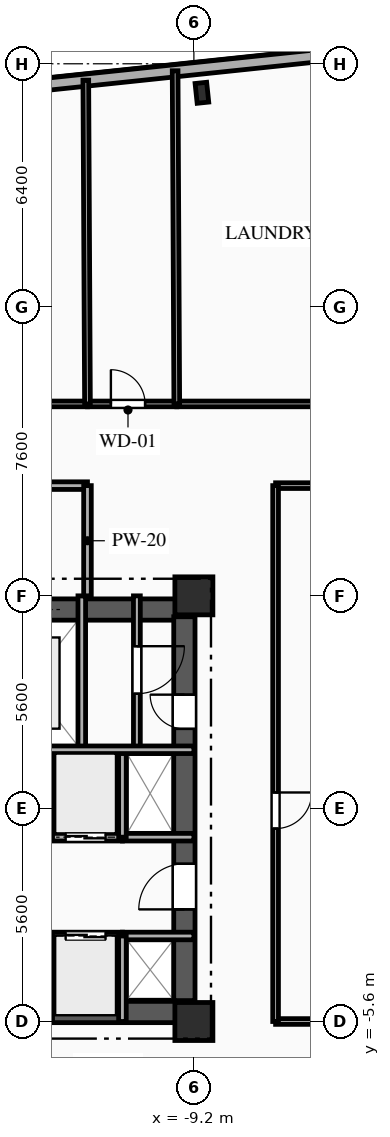
"""IFC4 building model, lengths in metres.
Left out: names, types, materials, properties, quantities, classifications, styles, units other than length and angle.
Written with IfcOpenShell. Run it as: python <this file> out.ifc"""

import sys

from ifc_helpers import new_model, si_unit, direction, frame, frame_2d, origin, origin_2d, place, context, subcontext, project, spatial, rectangle, i_section, extrude, element, fill, save


model = new_model("IFC4")
c1 = context("Model", 3, precision=1e-05, world=origin(), true_north=direction((0.0, 1.0)))
c2 = subcontext(c1, "Body", "Model", "MODEL_VIEW")
j1 = project(units=[si_unit("LENGTHUNIT", "METRE"), si_unit("PLANEANGLEUNIT", "RADIAN")], contexts=[c1])
p1 = place(None, origin())
s1 = spatial("IfcSite", under=j1, at=p1, CompositionType="ELEMENT")
p2 = place(p1, origin())
s2 = spatial("IfcBuilding", under=s1, at=p2, CompositionType="ELEMENT")
p3 = place(p2, frame((0.0, 0.0, 112.5)))
s3 = spatial("IfcBuildingStorey", under=s2, at=p3, CompositionType="ELEMENT", Elevation=112.5)
for number, where, z_axis, x_axis in (
    (1, (-9.2, -5.6, 0.0), (0.0, 0.0, 1.0), (1.0, 0.0, 0.0)),
    (2, (-9.2, 5.6, 0.0), (0.0, 0.0, 1.0), (1.0, 0.0, 0.0)),
):
    element("IfcColumn", number, at=place(p3, frame(where, z_axis=z_axis, x_axis=x_axis)), inside=s3, PredefinedType="COLUMN", context=c2, shape_type="SweptSolid", body=[
        extrude(rectangle(XDim=1.0, YDim=1.0, at=origin_2d()), origin(), (0.0, 0.0, 1.0), 3.35),
    ])
p4 = place(p3, frame((-8.989, 18.836, 0.0), z_axis=(0.0, 0.0, 1.0), x_axis=(0.994521895368, 0.104528463268, 0.0)))
e3 = element("IfcColumn", 3, at=p4, inside=s3, PredefinedType="COLUMN", context=c2, shape_type="SweptSolid", body=[
    extrude(i_section(OverallWidth=0.306, OverallDepth=0.524, WebThickness=0.021, FlangeThickness=0.04, FilletRadius=0.027, at=origin_2d()), origin(), (0.0, 0.0, 1.0), 3.35),
])
p5 = place(p3, frame((-27.107, 17.586, 0.0), z_axis=(0.0, 0.0, 1.0), x_axis=(0.994521628355, 0.104531003701, 0.0)))
e4 = element("IfcWall", 4, at=p5, inside=s3, PredefinedType="SOLIDWALL", context=c2, shape_type="SweptSolid", body=[
    extrude(rectangle(XDim=53.8, YDim=0.32, at=frame_2d((26.9, 0.0))), origin(), (0.0, 0.0, 1.0), 3.045),
])
p6 = place(p5, frame((1.482, 0.0, 0.85)))
e5 = element("IfcOpeningElement", 5, at=p6, cuts=e4, PredefinedType="OPENING", context=c2, shape_type="SweptSolid", body=[
    extrude(rectangle(XDim=1.6, YDim=1.85, at=frame_2d((0.8, 0.925))), frame((0.0, 0.17, 0.0), z_axis=(0.0, -1.0, 0.0), x_axis=(1.0, 0.0, 0.0)), (0.0, 0.0, 1.0), 0.34),
])
p7 = place(p5, frame((6.02, 0.0, 0.85)))
e6 = element("IfcOpeningElement", 6, at=p7, cuts=e4, PredefinedType="OPENING", context=c2, shape_type="SweptSolid", body=[
    extrude(rectangle(XDim=1.65, YDim=1.85, at=frame_2d((0.825, 0.925))), frame((0.0, 0.17, 0.0), z_axis=(0.0, -1.0, 0.0), x_axis=(1.0, 0.0, 0.0)), (0.0, 0.0, 1.0), 0.34),
])
p8 = place(p5, frame((11.584, 0.0, 0.85)))
e7 = element("IfcOpeningElement", 7, at=p8, cuts=e4, PredefinedType="OPENING", context=c2, shape_type="SweptSolid", body=[
    extrude(rectangle(XDim=1.65, YDim=1.85, at=frame_2d((0.825, 0.925))), frame((0.0, 0.17, 0.0), z_axis=(0.0, -1.0, 0.0), x_axis=(1.0, 0.0, 0.0)), (0.0, 0.0, 1.0), 0.34),
])
p9 = place(p5, frame((21.336, 0.0, 0.85)))
e8 = element("IfcOpeningElement", 8, at=p9, cuts=e4, PredefinedType="OPENING", context=c2, shape_type="SweptSolid", body=[
    extrude(rectangle(XDim=1.6, YDim=1.85, at=frame_2d((0.8, 0.925))), frame((0.0, 0.17, 0.0), z_axis=(0.0, -1.0, 0.0), x_axis=(1.0, 0.0, 0.0)), (0.0, 0.0, 1.0), 0.34),
])
p10 = place(p5, frame((31.404, 0.0, 0.85)))
e9 = element("IfcOpeningElement", 9, at=p10, cuts=e4, PredefinedType="OPENING", context=c2, shape_type="SweptSolid", body=[
    extrude(rectangle(XDim=2.2, YDim=1.85, at=frame_2d((1.1, 0.925))), frame((0.0, 0.17, 0.0), z_axis=(0.0, -1.0, 0.0), x_axis=(1.0, 0.0, 0.0)), (0.0, 0.0, 1.0), 0.34),
])
p11 = place(p5, frame((40.486, 0.0, 0.85)))
e10 = element("IfcOpeningElement", 10, at=p11, cuts=e4, PredefinedType="OPENING", context=c2, shape_type="SweptSolid", body=[
    extrude(rectangle(XDim=1.65, YDim=1.85, at=frame_2d((0.825, 0.925))), frame((0.0, 0.17, 0.0), z_axis=(0.0, -1.0, 0.0), x_axis=(1.0, 0.0, 0.0)), (0.0, 0.0, 1.0), 0.34),
])
p12 = place(p5, frame((46.53, 0.0, 0.85)))
e11 = element("IfcOpeningElement", 11, at=p12, cuts=e4, PredefinedType="OPENING", context=c2, shape_type="SweptSolid", body=[
    extrude(rectangle(XDim=1.65, YDim=1.85, at=frame_2d((0.825, 0.925))), frame((0.0, 0.17, 0.0), z_axis=(0.0, -1.0, 0.0), x_axis=(1.0, 0.0, 0.0)), (0.0, 0.0, 1.0), 0.34),
])
p13 = place(p5, frame((51.054, 0.0, 0.85)))
e12 = element("IfcOpeningElement", 12, at=p13, cuts=e4, PredefinedType="OPENING", context=c2, shape_type="SweptSolid", body=[
    extrude(rectangle(XDim=1.65, YDim=1.85, at=frame_2d((0.825, 0.925))), frame((0.0, 0.17, 0.0), z_axis=(0.0, -1.0, 0.0), x_axis=(1.0, 0.0, 0.0)), (0.0, 0.0, 1.0), 0.34),
])
p14 = place(p3, frame((-18.8, 5.24, 0.0), z_axis=(0.0, 0.0, 1.0), x_axis=(1.0, 0.0, 0.0)))
e13 = element("IfcWall", 13, at=p14, inside=s3, PredefinedType="SHEAR", context=c2, shape_type="SweptSolid", body=[
    extrude(rectangle(XDim=9.6, YDim=0.56, at=frame_2d((4.8, 0.0))), origin(), (0.0, 0.0, 1.0), 3.045),
])
p15 = place(p14, frame((1.55, 0.0, 0.0)))
e14 = element("IfcOpeningElement", 14, at=p15, cuts=e13, PredefinedType="OPENING", context=c2, shape_type="SweptSolid", body=[
    extrude(rectangle(XDim=1.1, YDim=2.15, at=frame_2d((0.55, 1.075))), frame((0.0, 0.29, 0.0), z_axis=(0.0, -1.0, 0.0), x_axis=(1.0, 0.0, 0.0)), (0.0, 0.0, 1.0), 0.58),
])
p16 = place(p14, frame((4.775, 0.0, 0.0)))
e15 = element("IfcOpeningElement", 15, at=p16, cuts=e13, PredefinedType="OPENING", context=c2, shape_type="SweptSolid", body=[
    extrude(rectangle(XDim=1.05, YDim=2.1, at=frame_2d((0.525, 1.05))), frame((0.0, 0.29, 0.0), z_axis=(0.0, -1.0, 0.0), x_axis=(1.0, 0.0, 0.0)), (0.0, 0.0, 1.0), 0.58),
])
p17 = place(p3, frame((-18.8, -5.35, 0.0), z_axis=(0.0, 0.0, 1.0), x_axis=(1.0, 0.0, 0.0)))
e16 = element("IfcWall", 16, at=p17, inside=s3, PredefinedType="SHEAR", context=c2, shape_type="SweptSolid", body=[
    extrude(rectangle(XDim=9.6, YDim=0.56, at=frame_2d((4.8, 0.0))), origin(), (0.0, 0.0, 1.0), 3.045),
])
p18 = place(p17, frame((1.05, 0.0, 0.0)))
e17 = element("IfcOpeningElement", 17, at=p18, cuts=e16, PredefinedType="OPENING", context=c2, shape_type="SweptSolid", body=[
    extrude(rectangle(XDim=0.9, YDim=2.1, at=frame_2d((0.45, 1.05))), frame((0.0, 0.29, 0.0), z_axis=(0.0, -1.0, 0.0), x_axis=(1.0, 0.0, 0.0)), (0.0, 0.0, 1.0), 0.58),
])
p19 = place(p3, frame((-9.45, -5.05, 0.0), z_axis=(0.0, 0.0, 1.0), x_axis=(0.0, 1.0, 0.0)))
e18 = element("IfcWall", 18, at=p19, inside=s3, PredefinedType="SHEAR", context=c2, shape_type="SweptSolid", body=[
    extrude(rectangle(XDim=10.1, YDim=0.56, at=frame_2d((5.05, 0.0))), origin(), (0.0, 0.0, 1.0), 3.045),
])
p20 = place(p19, frame((7.15, 0.0, 0.0)))
e19 = element("IfcOpeningElement", 19, at=p20, cuts=e18, PredefinedType="OPENING", context=c2, shape_type="SweptSolid", body=[
    extrude(rectangle(XDim=0.9, YDim=2.1, at=frame_2d((0.45, 1.05))), frame((0.0, 0.29, 0.0), z_axis=(0.0, -1.0, 0.0), x_axis=(1.0, 0.0, 0.0)), (0.0, 0.0, 1.0), 0.58),
])
p21 = place(p19, frame((2.4, 0.0, 0.0)))
e20 = element("IfcOpeningElement", 20, at=p21, cuts=e18, PredefinedType="OPENING", context=c2, shape_type="SweptSolid", body=[
    extrude(rectangle(XDim=1.2, YDim=2.15, at=frame_2d((0.6, 1.075))), frame((0.0, 0.29, 0.0), z_axis=(0.0, -1.0, 0.0), x_axis=(1.0, 0.0, 0.0)), (0.0, 0.0, 1.0), 0.58),
])
p22 = place(p3, frame((-12.15, 1.55, 0.0), z_axis=(0.0, 0.0, 1.0), x_axis=(0.0, 1.0, 0.0)))
e21 = element("IfcWall", 21, at=p22, inside=s3, PredefinedType="PARTITIONING", context=c2, shape_type="SweptSolid", body=[
    extrude(rectangle(XDim=4.05, YDim=0.2, at=frame_2d((2.025, 0.0))), origin(), (0.0, 0.0, 1.0), 3.045),
])
p23 = place(p3, frame((-12.0, 8.5, 0.0), z_axis=(0.0, 0.0, 1.0), x_axis=(-1.0, 0.0, 0.0)))
e22 = element("IfcWall", 22, at=p23, inside=s3, PredefinedType="PARTITIONING", context=c2, shape_type="SweptSolid", body=[
    extrude(rectangle(XDim=6.8, YDim=0.2, at=frame_2d((3.4, 0.0))), origin(), (0.0, 0.0, 1.0), 3.045),
])
p24 = place(p23, frame((1.715, 0.0, 0.0)))
e23 = element("IfcOpeningElement", 23, at=p24, cuts=e22, PredefinedType="OPENING", context=c2, shape_type="SweptSolid", body=[
    extrude(rectangle(XDim=1.1, YDim=2.15, at=frame_2d((0.55, 1.075))), frame((0.0, 0.11, 0.0), z_axis=(0.0, -1.0, 0.0), x_axis=(1.0, 0.0, 0.0)), (0.0, 0.0, 1.0), 0.22),
])
p25 = place(p3, frame((-12.0, 5.6, 0.0), z_axis=(0.0, 0.0, 1.0), x_axis=(0.0, 1.0, 0.0)))
e24 = element("IfcWall", 24, at=p25, inside=s3, PredefinedType="PARTITIONING", context=c2, shape_type="SweptSolid", body=[
    extrude(rectangle(XDim=2.9, YDim=0.2, at=frame_2d((1.45, 0.0))), origin(), (0.0, 0.0, 1.0), 3.045),
])
p26 = place(p3, frame((-10.7, 5.6, 0.0), z_axis=(0.0, 0.0, 1.0), x_axis=(0.0, -1.0, 0.0)))
e25 = element("IfcWall", 25, at=p26, inside=s3, PredefinedType="PARTITIONING", context=c2, shape_type="SweptSolid", body=[
    extrude(rectangle(XDim=4.05, YDim=0.18, at=frame_2d((2.025, 0.0))), origin(), (0.0, 0.0, 1.0), 3.045),
])
p27 = place(p26, frame((1.325, 0.0, 0.0)))
e26 = element("IfcOpeningElement", 26, at=p27, cuts=e25, PredefinedType="OPENING", context=c2, shape_type="SweptSolid", body=[
    extrude(rectangle(XDim=1.25, YDim=2.2, at=frame_2d((0.625, 1.1))), frame((0.0, 0.1, 0.0), z_axis=(0.0, -1.0, 0.0), x_axis=(1.0, 0.0, 0.0)), (0.0, 0.0, 1.0), 0.2),
])
p28 = place(p3, frame((-13.02, -3.35, 0.0), z_axis=(0.0, 0.0, 1.0), x_axis=(1.0, 0.0, 0.0)))
e27 = element("IfcWall", 27, at=p28, inside=s3, PredefinedType="PARTITIONING", context=c2, shape_type="SweptSolid", body=[
    extrude(rectangle(XDim=1.94, YDim=0.2, at=frame_2d((0.97, 0.0))), origin(), (0.0, 0.0, 1.0), 3.045),
])
p29 = place(p28, frame((0.445, 0.0, 0.0)))
e28 = element("IfcOpeningElement", 28, at=p29, cuts=e27, PredefinedType="OPENING", context=c2, shape_type="SweptSolid", body=[
    extrude(rectangle(XDim=1.05, YDim=2.1, at=frame_2d((0.525, 1.05))), frame((0.0, 0.11, 0.0), z_axis=(0.0, -1.0, 0.0), x_axis=(1.0, 0.0, 0.0)), (0.0, 0.0, 1.0), 0.22),
])
p30 = place(p3, frame((-11.08, -3.35, 0.0), z_axis=(0.0, 0.0, 1.0), x_axis=(1.0, 0.0, 0.0)))
e29 = element("IfcWall", 29, at=p30, inside=s3, PredefinedType="PARTITIONING", context=c2, shape_type="SweptSolid", body=[
    extrude(rectangle(XDim=1.88, YDim=0.2, at=frame_2d((0.94, 0.0))), origin(), (0.0, 0.0, 1.0), 2.76),
])
p31 = place(p3, frame((-11.08, -0.75, 0.0), z_axis=(0.0, 0.0, 1.0), x_axis=(-1.0, 0.0, 0.0)))
e30 = element("IfcWall", 30, at=p31, inside=s3, PredefinedType="PARTITIONING", context=c2, shape_type="SweptSolid", body=[
    extrude(rectangle(XDim=1.94, YDim=0.2, at=frame_2d((0.97, 0.0))), origin(), (0.0, 0.0, 1.0), 3.045),
])
p32 = place(p31, frame((0.445, 0.0, 0.0)))
e31 = element("IfcOpeningElement", 31, at=p32, cuts=e30, PredefinedType="OPENING", context=c2, shape_type="SweptSolid", body=[
    extrude(rectangle(XDim=1.05, YDim=2.1, at=frame_2d((0.525, 1.05))), frame((0.0, 0.11, 0.0), z_axis=(0.0, -1.0, 0.0), x_axis=(1.0, 0.0, 0.0)), (0.0, 0.0, 1.0), 0.22),
])
p33 = place(p3, frame((-9.2, -0.75, 0.0), z_axis=(0.0, 0.0, 1.0), x_axis=(-1.0, 0.0, 0.0)))
e32 = element("IfcWall", 32, at=p33, inside=s3, PredefinedType="PARTITIONING", context=c2, shape_type="SweptSolid", body=[
    extrude(rectangle(XDim=1.88, YDim=0.2, at=frame_2d((0.94, 0.0))), origin(), (0.0, 0.0, 1.0), 3.045),
])
for number, where, z_axis, x_axis in (
    (33, (-13.02, -5.6, 0.0), (0.0, 0.0, 1.0), (0.0, 1.0, 0.0)),
    (34, (-11.08, -5.6, 0.0), (0.0, 0.0, 1.0), (0.0, 1.0, 0.0)),
):
    element("IfcWall", number, at=place(p3, frame(where, z_axis=z_axis, x_axis=x_axis)), inside=s3, PredefinedType="PARTITIONING", context=c2, shape_type="SweptSolid", body=[
        extrude(rectangle(XDim=2.25, YDim=0.2, at=frame_2d((1.125, 0.0))), origin(), (0.0, 0.0, 1.0), 3.045),
    ])
for number, where, z_axis, x_axis in (
    (35, (-13.02, -0.75, 0.0), (0.0, 0.0, 1.0), (0.0, 1.0, 0.0)),
    (36, (-11.08, -0.75, 0.0), (0.0, 0.0, 1.0), (0.0, 1.0, 0.0)),
):
    element("IfcWall", number, at=place(p3, frame(where, z_axis=z_axis, x_axis=x_axis)), inside=s3, PredefinedType="PARTITIONING", context=c2, shape_type="SweptSolid", body=[
        extrude(rectangle(XDim=2.3, YDim=0.2, at=frame_2d((1.15, 0.0))), origin(), (0.0, 0.0, 1.0), 3.045),
    ])
p34 = place(p3, frame((-17.5, 10.65, 0.0), z_axis=(0.0, 0.0, 1.0), x_axis=(1.0, 0.0, 0.0)))
e37 = element("IfcWall", 37, at=p34, inside=s3, PredefinedType="PARTITIONING", context=c2, shape_type="SweptSolid", body=[
    extrude(rectangle(XDim=5.5, YDim=0.15, at=frame_2d((2.75, 0.0))), origin(), (0.0, 0.0, 1.0), 3.045),
])
p35 = place(p34, frame((3.048, 0.0, 0.0)))
e38 = element("IfcOpeningElement", 38, at=p35, cuts=e37, PredefinedType="OPENING", context=c2, shape_type="SweptSolid", body=[
    extrude(rectangle(XDim=1.05, YDim=2.15, at=frame_2d((0.525, 1.075))), frame((0.0, 0.085, 0.0), z_axis=(0.0, -1.0, 0.0), x_axis=(1.0, 0.0, 0.0)), (0.0, 0.0, 1.0), 0.17),
])
p36 = place(p3, frame((-12.0, 10.65, 0.0), z_axis=(0.0, 0.0, 1.0), x_axis=(1.0, 0.0, 0.0)))
e39 = element("IfcWall", 39, at=p36, inside=s3, PredefinedType="PLUMBINGWALL", context=c2, shape_type="SweptSolid", body=[
    extrude(rectangle(XDim=2.35, YDim=0.15, at=frame_2d((1.175, 0.0))), origin(), (0.0, 0.0, 1.0), 3.045),
])
p37 = place(p36, frame((0.616, 0.0, 0.0)))
e40 = element("IfcOpeningElement", 40, at=p37, cuts=e39, PredefinedType="OPENING", context=c2, shape_type="SweptSolid", body=[
    extrude(rectangle(XDim=0.9, YDim=2.1, at=frame_2d((0.45, 1.05))), frame((0.0, 0.085, 0.0), z_axis=(0.0, -1.0, 0.0), x_axis=(1.0, 0.0, 0.0)), (0.0, 0.0, 1.0), 0.17),
])
p38 = place(p3, frame((-9.65, 10.65, 0.0), z_axis=(0.0, 0.0, 1.0), x_axis=(1.0, 0.0, 0.0)))
e41 = element("IfcWall", 41, at=p38, inside=s3, PredefinedType="PARTITIONING", context=c2, shape_type="SweptSolid", body=[
    extrude(rectangle(XDim=9.15, YDim=0.15, at=frame_2d((4.575, 0.0))), origin(), (0.0, 0.0, 1.0), 3.045),
])
p39 = place(p38, frame((6.74, 0.0, 0.0)))
e42 = element("IfcOpeningElement", 42, at=p39, cuts=e41, PredefinedType="OPENING", context=c2, shape_type="SweptSolid", body=[
    extrude(rectangle(XDim=0.95, YDim=2.1, at=frame_2d((0.475, 1.05))), frame((0.0, 0.085, 0.0), z_axis=(0.0, -1.0, 0.0), x_axis=(1.0, 0.0, 0.0)), (0.0, 0.0, 1.0), 0.17),
])
p40 = place(p3, frame((0.0, 8.5, 0.0), z_axis=(0.0, 0.0, 1.0), x_axis=(-1.0, 0.0, 0.0)))
e43 = element("IfcWall", 43, at=p40, inside=s3, PredefinedType="PARTITIONING", context=c2, shape_type="SweptSolid", body=[
    extrude(rectangle(XDim=7.05, YDim=0.15, at=frame_2d((3.525, 0.0))), origin(), (0.0, 0.0, 1.0), 3.045),
])
p41 = place(p3, frame((-7.05, -5.6, 0.0), z_axis=(0.0, 0.0, 1.0), x_axis=(1.0, 0.0, 0.0)))
e44 = element("IfcWall", 44, at=p41, inside=s3, PredefinedType="PARTITIONING", context=c2, shape_type="SweptSolid", body=[
    extrude(rectangle(XDim=7.05, YDim=0.15, at=frame_2d((3.525, 0.0))), origin(), (0.0, 0.0, 1.0), 2.53),
])
p42 = place(p3, frame((-7.05, 8.5, 0.0), z_axis=(0.0, 0.0, 1.0), x_axis=(0.0, -1.0, 0.0)))
e45 = element("IfcWall", 45, at=p42, inside=s3, PredefinedType="PARTITIONING", context=c2, shape_type="SweptSolid", body=[
    extrude(rectangle(XDim=14.1, YDim=0.15, at=frame_2d((7.05, 0.0))), origin(), (0.0, 0.0, 1.0), 3.045),
])
p43 = place(p42, frame((8.074, 0.0, 0.0)))
e46 = element("IfcOpeningElement", 46, at=p43, cuts=e45, PredefinedType="OPENING", context=c2, shape_type="SweptSolid", body=[
    extrude(rectangle(XDim=0.95, YDim=2.1, at=frame_2d((0.475, 1.05))), frame((0.0, 0.085, 0.0), z_axis=(0.0, -1.0, 0.0), x_axis=(1.0, 0.0, 0.0)), (0.0, 0.0, 1.0), 0.17),
])
p44 = place(p3, frame((-12.044, 19.169, 0.0), z_axis=(0.0, 0.0, 1.0), x_axis=(0.005158411336, -0.999986695308, 0.0)))
e47 = element("IfcWall", 47, at=p44, inside=s3, PredefinedType="PLUMBINGWALL", context=c2, shape_type="SweptSolid", body=[
    extrude(rectangle(XDim=8.519, YDim=0.15, at=frame_2d((4.26, 0.0))), origin(), (0.0, 0.0, 1.0), 3.045),
])
p45 = place(p3, frame((-9.694, 19.416, 0.0), z_axis=(0.0, 0.0, 1.0), x_axis=(0.005013026743, -0.999987434702, 0.0)))
e48 = element("IfcWall", 48, at=p45, inside=s3, PredefinedType="PLUMBINGWALL", context=c2, shape_type="SweptSolid", body=[
    extrude(rectangle(XDim=8.766, YDim=0.15, at=frame_2d((4.383, 0.0))), origin(), (0.0, 0.0, 1.0), 3.045),
])
p46 = place(p3, frame((-15.05, 1.55, 0.0), z_axis=(0.0, 0.0, 1.0), x_axis=(1.0, 0.0, 0.0)))
e49 = element("IfcWall", 49, at=p46, inside=s3, PredefinedType="PARTITIONING", context=c2, shape_type="SweptSolid", body=[
    extrude(rectangle(XDim=5.85, YDim=0.2, at=frame_2d((2.925, 0.0))), origin(), (0.0, 0.0, 1.0), 3.045),
])
p47 = place(p27, origin())
e50 = element("IfcDoor", 50, at=p47, inside=s3, OperationType="SINGLE_SWING_LEFT", PredefinedType="DOOR", context=c2, shape_type="SweptSolid", body=[
    extrude(rectangle(XDim=1.25, YDim=2.2, at=frame_2d((0.625, 1.1))), frame((0.0, 0.025, 0.0), z_axis=(0.0, -1.0, 0.0), x_axis=(1.0, 0.0, 0.0)), (0.0, 0.0, 1.0), 0.05),
])
fill(e26, e50)
p48 = place(p20, origin())
e51 = element("IfcDoor", 51, at=p48, inside=s3, OperationType="SINGLE_SWING_RIGHT", PredefinedType="DOOR", context=c2, shape_type="SweptSolid", body=[
    extrude(rectangle(XDim=0.9, YDim=2.1, at=frame_2d((0.45, 1.05))), frame((0.0, 0.025, 0.0), z_axis=(0.0, -1.0, 0.0), x_axis=(1.0, 0.0, 0.0)), (0.0, 0.0, 1.0), 0.05),
])
fill(e19, e51)
p49 = place(p29, origin())
e52 = element("IfcDoor", 52, at=p49, inside=s3, OperationType="DOUBLE_DOOR_SLIDING", PredefinedType="DOOR", context=c2, shape_type="SweptSolid", body=[
    extrude(rectangle(XDim=1.05, YDim=2.1, at=frame_2d((0.525, 1.05))), frame((0.0, 0.025, 0.0), z_axis=(0.0, -1.0, 0.0), x_axis=(1.0, 0.0, 0.0)), (0.0, 0.0, 1.0), 0.05),
])
fill(e28, e52)
p50 = place(p32, origin())
e53 = element("IfcDoor", 53, at=p50, inside=s3, OperationType="DOUBLE_DOOR_SLIDING", PredefinedType="DOOR", context=c2, shape_type="SweptSolid", body=[
    extrude(rectangle(XDim=1.05, YDim=2.1, at=frame_2d((0.525, 1.05))), frame((0.0, 0.025, 0.0), z_axis=(0.0, -1.0, 0.0), x_axis=(1.0, 0.0, 0.0)), (0.0, 0.0, 1.0), 0.05),
])
fill(e31, e53)
p51 = place(p21, origin())
e54 = element("IfcDoor", 54, at=p51, inside=s3, OperationType="SINGLE_SWING_LEFT", PredefinedType="DOOR", context=c2, shape_type="SweptSolid", body=[
    extrude(rectangle(XDim=1.2, YDim=2.15, at=frame_2d((0.6, 1.075))), frame((0.0, 0.025, 0.0), z_axis=(0.0, -1.0, 0.0), x_axis=(1.0, 0.0, 0.0)), (0.0, 0.0, 1.0), 0.05),
])
fill(e20, e54)
p52 = place(p37, origin())
e55 = element("IfcDoor", 55, at=p52, inside=s3, OperationType="SINGLE_SWING_LEFT", PredefinedType="DOOR", context=c2, shape_type="SweptSolid", body=[
    extrude(rectangle(XDim=0.9, YDim=2.1, at=frame_2d((0.45, 1.05))), frame((0.0, 0.025, 0.0), z_axis=(0.0, -1.0, 0.0), x_axis=(1.0, 0.0, 0.0)), (0.0, 0.0, 1.0), 0.05),
])
fill(e40, e55)
p53 = place(p43, origin())
e56 = element("IfcDoor", 56, at=p53, inside=s3, OperationType="SINGLE_SWING_LEFT", PredefinedType="DOOR", context=c2, shape_type="SweptSolid", body=[
    extrude(rectangle(XDim=0.95, YDim=2.1, at=frame_2d((0.475, 1.05))), frame((0.0, 0.025, 0.0), z_axis=(0.0, -1.0, 0.0), x_axis=(1.0, 0.0, 0.0)), (0.0, 0.0, 1.0), 0.05),
])
fill(e46, e56)
save(model, sys.argv[1])
